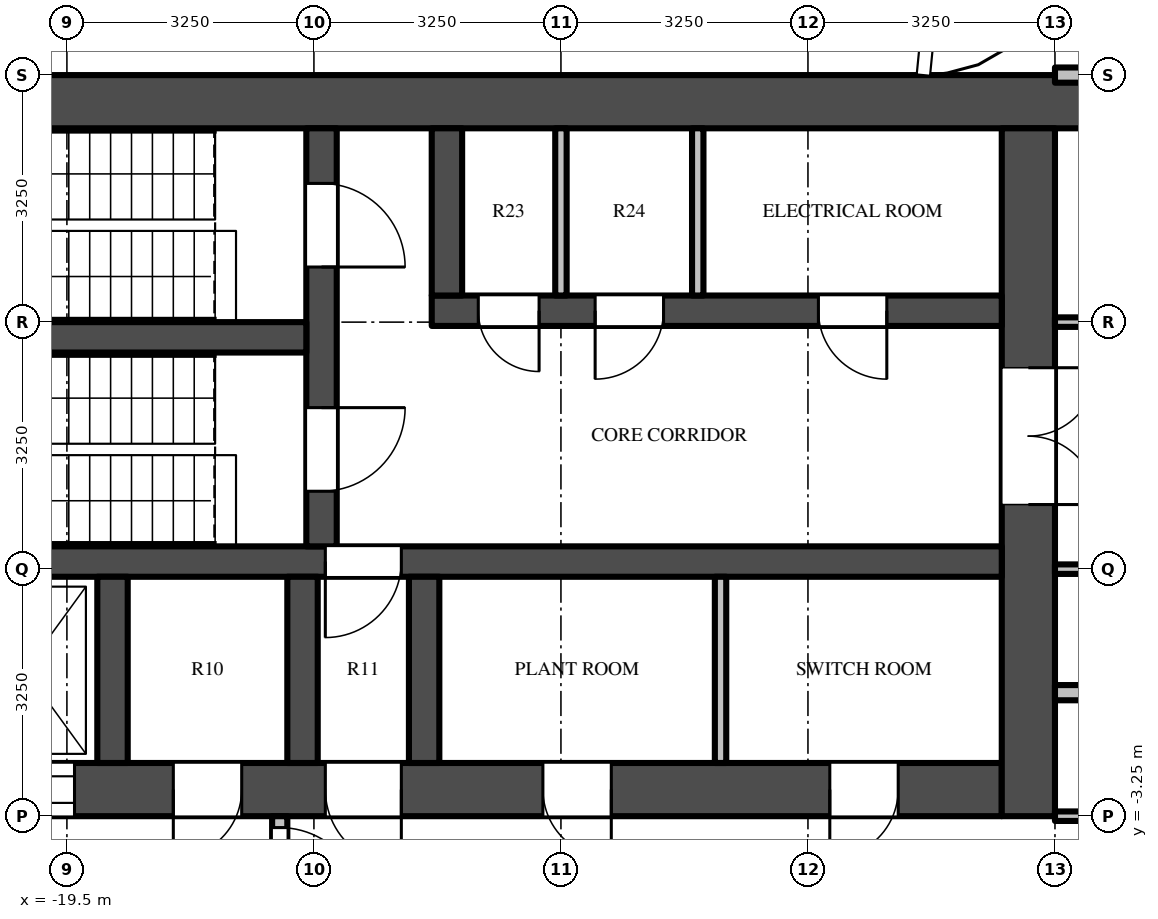
"""IFC4 building model, lengths in metres.
Left out: names, types, materials, properties, quantities, classifications, styles, units other than length and angle.
Written with IfcOpenShell. Run it as: python <this file> out.ifc"""

import sys

from ifc_helpers import new_model, si_unit, direction, frame, frame_2d, origin, place, context, subcontext, project, spatial, rectangle, extrude, source, transform, mapped, element, fill, save


model = new_model("IFC4")
c1 = context("Model", 3, precision=1e-05, world=origin(), true_north=direction((0.0, 1.0)))
c2 = subcontext(c1, "Body", "Model", "MODEL_VIEW")
j1 = project(units=[si_unit("LENGTHUNIT", "METRE"), si_unit("PLANEANGLEUNIT", "RADIAN")], contexts=[c1])
p1 = place(None, origin())
s1 = spatial("IfcSite", under=j1, at=p1, CompositionType="ELEMENT")
p2 = place(p1, origin())
s2 = spatial("IfcBuilding", under=s1, at=p2, CompositionType="ELEMENT")
p3 = place(p2, frame((0.0, 0.0, 350.1)))
s3 = spatial("IfcBuildingStorey", under=s2, at=p3, CompositionType="ELEMENT", Elevation=350.1)
m1 = source(origin(), c2, "Body", "SweptSolid", [
    extrude(rectangle(XDim=16.75, YDim=0.7, at=frame_2d((8.375, 0.0))), origin(), (0.0, 0.0, 1.0), 3.75),
])
p4 = place(p3, frame((-6.0, 6.15, 0.0), z_axis=(0.0, 0.0, 1.0), x_axis=(-1.0, 0.0, 0.0)))
e1 = element("IfcWall", 1, at=p4, inside=s3, PredefinedType="SHEAR", context=c2, shape_type="MappedRepresentation", body=[
    mapped(m1, transform((0.0, 0.0, 0.0))),
])
m2 = source(origin(), c2, "Body", "SweptSolid", [
    extrude(rectangle(XDim=14.85, YDim=0.7, at=frame_2d((7.425, 0.0))), origin(), (0.0, 0.0, 1.0), 3.75),
])
p5 = place(p3, frame((-7.2, -2.9, 0.0), z_axis=(0.0, 0.0, 1.0), x_axis=(-1.0, 0.0, 0.0)))
e2 = element("IfcWall", 2, at=p5, inside=s3, PredefinedType="SHEAR", context=c2, shape_type="MappedRepresentation", body=[
    mapped(m2, transform((0.0, 0.0, 0.0))),
])
m3 = source(origin(), c2, "Body", "SweptSolid", [
    extrude(rectangle(XDim=1.3, YDim=2.1, at=frame_2d((0.65, 1.05))), frame((0.0, 0.36, 0.0), z_axis=(0.0, -1.0, 0.0), x_axis=(1.0, 0.0, 0.0)), (0.0, 0.0, 1.0), 0.72),
])
p6 = place(p5, frame((12.2, 0.0, 0.0)))
e3 = element("IfcOpeningElement", 3, at=p6, cuts=e2, PredefinedType="OPENING", context=c2, shape_type="MappedRepresentation", body=[
    mapped(m3, transform((0.0, 0.0, 0.0))),
])
m4 = source(origin(), c2, "Body", "SweptSolid", [
    extrude(rectangle(XDim=1.0, YDim=2.1, at=frame_2d((0.5, 1.05))), frame((0.0, 0.36, 0.0), z_axis=(0.0, -1.0, 0.0), x_axis=(1.0, 0.0, 0.0)), (0.0, 0.0, 1.0), 0.72),
])
p7 = place(p5, frame((7.9, 0.0, 0.0)))
e4 = element("IfcOpeningElement", 4, at=p7, cuts=e2, PredefinedType="OPENING", context=c2, shape_type="MappedRepresentation", body=[
    mapped(m4, transform((0.0, 0.0, 0.0))),
])
m5 = source(origin(), c2, "Body", "SweptSolid", [
    extrude(rectangle(XDim=0.9, YDim=2.1, at=frame_2d((0.45, 1.05))), frame((0.0, 0.36, 0.0), z_axis=(0.0, -1.0, 0.0), x_axis=(1.0, 0.0, 0.0)), (0.0, 0.0, 1.0), 0.72),
])
p8 = place(p5, frame((1.363, 0.0, 0.0)))
e5 = element("IfcOpeningElement", 5, at=p8, cuts=e2, PredefinedType="OPENING", context=c2, shape_type="MappedRepresentation", body=[
    mapped(m5, transform((0.0, 0.0, 0.0))),
])
p9 = place(p5, frame((5.137, 0.0, 0.0)))
e6 = element("IfcOpeningElement", 6, at=p9, cuts=e2, PredefinedType="OPENING", context=c2, shape_type="MappedRepresentation", body=[
    mapped(m5, transform((0.0, 0.0, 0.0))),
])
p10 = place(p5, frame((10.0, 0.0, 0.0)))
e7 = element("IfcOpeningElement", 7, at=p10, cuts=e2, PredefinedType="OPENING", context=c2, shape_type="MappedRepresentation", body=[
    mapped(m5, transform((0.0, 0.0, 0.0))),
])
m6 = source(origin(), c2, "Body", "SweptSolid", [
    extrude(rectangle(XDim=9.05, YDim=0.7, at=frame_2d((4.525, 0.0))), origin(), (0.0, 0.0, 1.0), 3.75),
])
p11 = place(p3, frame((-6.85, 5.8, 0.0), z_axis=(0.0, 0.0, 1.0), x_axis=(0.0, -1.0, 0.0)))
e8 = element("IfcWall", 8, at=p11, inside=s3, PredefinedType="SHEAR", context=c2, shape_type="MappedRepresentation", body=[
    mapped(m6, transform((0.0, 0.0, 0.0))),
])
m7 = source(origin(), c2, "Body", "SweptSolid", [
    extrude(rectangle(XDim=1.8, YDim=2.1, at=frame_2d((0.9, 1.05))), frame((0.0, 0.36, 0.0), z_axis=(0.0, -1.0, 0.0), x_axis=(1.0, 0.0, 0.0)), (0.0, 0.0, 1.0), 0.72),
])
p12 = place(p11, frame((3.15, 0.0, 0.0)))
e9 = element("IfcOpeningElement", 9, at=p12, cuts=e8, PredefinedType="OPENING", context=c2, shape_type="MappedRepresentation", body=[
    mapped(m7, transform((0.0, 0.0, 0.0))),
])
m8 = source(origin(), c2, "Body", "SweptSolid", [
    extrude(rectangle(XDim=7.5, YDim=0.4, at=frame_2d((3.75, 0.0))), origin(), (0.0, 0.0, 1.0), 3.75),
])
p13 = place(p3, frame((-7.2, 3.4, 0.0), z_axis=(0.0, 0.0, 1.0), x_axis=(-1.0, 0.0, 0.0)))
e10 = element("IfcWall", 10, at=p13, inside=s3, PredefinedType="SHEAR", context=c2, shape_type="MappedRepresentation", body=[
    mapped(m8, transform((0.0, 0.0, 0.0))),
])
m9 = source(origin(), c2, "Body", "SweptSolid", [
    extrude(rectangle(XDim=0.9, YDim=2.1, at=frame_2d((0.45, 1.05))), frame((0.0, 0.21, 0.0), z_axis=(0.0, -1.0, 0.0), x_axis=(1.0, 0.0, 0.0)), (0.0, 0.0, 1.0), 0.42),
])
p14 = place(p13, frame((1.512, 0.0, 0.0)))
e11 = element("IfcOpeningElement", 11, at=p14, cuts=e10, PredefinedType="OPENING", context=c2, shape_type="MappedRepresentation", body=[
    mapped(m9, transform((0.0, 0.0, 0.0))),
])
p15 = place(p13, frame((4.45, 0.0, 0.0)))
e12 = element("IfcOpeningElement", 12, at=p15, cuts=e10, PredefinedType="OPENING", context=c2, shape_type="MappedRepresentation", body=[
    mapped(m9, transform((0.0, 0.0, 0.0))),
])
m10 = source(origin(), c2, "Body", "SweptSolid", [
    extrude(rectangle(XDim=0.8, YDim=2.1, at=frame_2d((0.4, 1.05))), frame((0.0, 0.21, 0.0), z_axis=(0.0, -1.0, 0.0), x_axis=(1.0, 0.0, 0.0)), (0.0, 0.0, 1.0), 0.42),
])
p16 = place(p13, frame((6.087, 0.0, 0.0)))
e13 = element("IfcOpeningElement", 13, at=p16, cuts=e10, PredefinedType="OPENING", context=c2, shape_type="MappedRepresentation", body=[
    mapped(m10, transform((0.0, 0.0, 0.0))),
])
m11 = source(origin(), c2, "Body", "SweptSolid", [
    extrude(rectangle(XDim=14.85, YDim=0.4, at=frame_2d((7.425, 0.0))), origin(), (0.0, 0.0, 1.0), 3.75),
])
p17 = place(p3, frame((-7.2, 0.1, 0.0), z_axis=(0.0, 0.0, 1.0), x_axis=(-1.0, 0.0, 0.0)))
e14 = element("IfcWall", 14, at=p17, inside=s3, PredefinedType="SHEAR", context=c2, shape_type="MappedRepresentation", body=[
    mapped(m11, transform((0.0, 0.0, 0.0))),
])
m12 = source(origin(), c2, "Body", "SweptSolid", [
    extrude(rectangle(XDim=1.0, YDim=2.1, at=frame_2d((0.5, 1.05))), frame((0.0, 0.21, 0.0), z_axis=(0.0, -1.0, 0.0), x_axis=(1.0, 0.0, 0.0)), (0.0, 0.0, 1.0), 0.42),
])
p18 = place(p17, frame((7.9, 0.0, 0.0)))
e15 = element("IfcOpeningElement", 15, at=p18, cuts=e14, PredefinedType="OPENING", context=c2, shape_type="MappedRepresentation", body=[
    mapped(m12, transform((0.0, 0.0, 0.0))),
])
m13 = source(origin(), c2, "Body", "SweptSolid", [
    extrude(rectangle(XDim=5.5, YDim=0.4, at=frame_2d((2.75, 0.0))), origin(), (0.0, 0.0, 1.0), 3.75),
])
p19 = place(p3, frame((-16.15, 5.8, 0.0), z_axis=(0.0, 0.0, 1.0), x_axis=(0.0, -1.0, 0.0)))
e16 = element("IfcWall", 16, at=p19, inside=s3, PredefinedType="SHEAR", context=c2, shape_type="MappedRepresentation", body=[
    mapped(m13, transform((0.0, 0.0, 0.0))),
])
m14 = source(origin(), c2, "Body", "SweptSolid", [
    extrude(rectangle(XDim=1.1, YDim=2.1, at=frame_2d((0.55, 1.05))), frame((0.0, 0.21, 0.0), z_axis=(0.0, -1.0, 0.0), x_axis=(1.0, 0.0, 0.0)), (0.0, 0.0, 1.0), 0.42),
])
p20 = place(p19, frame((0.725, 0.0, 0.0)))
e17 = element("IfcOpeningElement", 17, at=p20, cuts=e16, PredefinedType="OPENING", context=c2, shape_type="MappedRepresentation", body=[
    mapped(m14, transform((0.0, 0.0, 0.0))),
])
p21 = place(p19, frame((3.675, 0.0, 0.0)))
e18 = element("IfcOpeningElement", 18, at=p21, cuts=e16, PredefinedType="OPENING", context=c2, shape_type="MappedRepresentation", body=[
    mapped(m14, transform((0.0, 0.0, 0.0))),
])
m15 = source(origin(), c2, "Body", "SweptSolid", [
    extrude(rectangle(XDim=5.7, YDim=0.4, at=frame_2d((2.85, 0.0))), origin(), (0.0, 0.0, 1.0), 3.75),
])
p22 = place(p3, frame((-16.35, 3.05, 0.0), z_axis=(0.0, 0.0, 1.0), x_axis=(-1.0, 0.0, 0.0)))
e19 = element("IfcWall", 19, at=p22, inside=s3, PredefinedType="SHEAR", context=c2, shape_type="MappedRepresentation", body=[
    mapped(m15, transform((0.0, 0.0, 0.0))),
])
m16 = source(origin(), c2, "Body", "SweptSolid", [
    extrude(rectangle(XDim=2.2, YDim=0.4, at=frame_2d((1.1, 0.0))), origin(), (0.0, 0.0, 1.0), 3.75),
])
p23 = place(p3, frame((-14.5, 5.8, 0.0), z_axis=(0.0, 0.0, 1.0), x_axis=(0.0, -1.0, 0.0)))
e20 = element("IfcWall", 20, at=p23, inside=s3, PredefinedType="SHEAR", context=c2, shape_type="MappedRepresentation", body=[
    mapped(m16, transform((0.0, 0.0, 0.0))),
])
m17 = source(origin(), c2, "Body", "SweptSolid", [
    extrude(rectangle(XDim=2.45, YDim=0.4, at=frame_2d((1.225, 0.0))), origin(), (0.0, 0.0, 1.0), 3.75),
])
for number, where, z_axis, x_axis in (
    (21, (-14.8, -0.1, 0.0), (0.0, 0.0, 1.0), (0.0, -1.0, 0.0)),
    (22, (-16.4, -0.1, 0.0), (0.0, 0.0, 1.0), (0.0, -1.0, 0.0)),
    (23, (-18.9, -0.1, 0.0), (0.0, 0.0, 1.0), (0.0, -1.0, 0.0)),
):
    element("IfcWall", number, at=place(p3, frame(where, z_axis=z_axis, x_axis=x_axis)), inside=s3, PredefinedType="SHEAR", context=c2, shape_type="MappedRepresentation", body=[
        mapped(m17, transform((0.0, 0.0, 0.0))),
    ])
m18 = source(origin(), c2, "Body", "SweptSolid", [
    extrude(rectangle(XDim=3.25, YDim=0.2, at=frame_2d((1.625, 0.0))), origin(), (0.0, 0.0, 1.0), 3.75),
])
p24 = place(p3, frame((-16.7, -3.25, 0.0), z_axis=(0.0, 0.0, 1.0), x_axis=(0.0, -1.0, 0.0)))
e24 = element("IfcWall", 24, at=p24, inside=s3, PredefinedType="PARTITIONING", context=c2, shape_type="MappedRepresentation", body=[
    mapped(m18, transform((0.0, 0.0, 0.0))),
])
m19 = source(origin(), c2, "Body", "SweptSolid", [
    extrude(rectangle(XDim=1.1, YDim=2.1, at=frame_2d((0.55, 1.05))), frame((0.0, 0.11, 0.0), z_axis=(0.0, -1.0, 0.0), x_axis=(1.0, 0.0, 0.0)), (0.0, 0.0, 1.0), 0.22),
])
p25 = place(p24, frame((0.15, 0.0, 0.0)))
e25 = element("IfcOpeningElement", 25, at=p25, cuts=e24, PredefinedType="OPENING", context=c2, shape_type="MappedRepresentation", body=[
    mapped(m19, transform((0.0, 0.0, 0.0))),
])
m20 = source(origin(), c2, "Body", "SweptSolid", [
    extrude(rectangle(XDim=2.2, YDim=0.15, at=frame_2d((1.1, 0.0))), origin(), (0.0, 0.0, 1.0), 3.75),
])
for number, where, z_axis, x_axis in (
    (26, (-11.2, 5.8, 0.0), (0.0, 0.0, 1.0), (0.0, -1.0, 0.0)),
    (27, (-13.0, 5.8, 0.0), (0.0, 0.0, 1.0), (0.0, -1.0, 0.0)),
):
    element("IfcWall", number, at=place(p3, frame(where, z_axis=z_axis, x_axis=x_axis)), inside=s3, PredefinedType="PARTITIONING", context=c2, shape_type="MappedRepresentation", body=[
        mapped(m20, transform((0.0, 0.0, 0.0))),
    ])
m21 = source(origin(), c2, "Body", "SweptSolid", [
    extrude(rectangle(XDim=2.45, YDim=0.15, at=frame_2d((1.225, 0.0))), origin(), (0.0, 0.0, 1.0), 3.75),
])
p26 = place(p3, frame((-10.9, -0.1, 0.0), z_axis=(0.0, 0.0, 1.0), x_axis=(0.0, -1.0, 0.0)))
e28 = element("IfcWall", 28, at=p26, inside=s3, PredefinedType="PARTITIONING", context=c2, shape_type="MappedRepresentation", body=[
    mapped(m21, transform((0.0, 0.0, 0.0))),
])
m22 = source(origin(), c2, "Body", "SweptSolid", [
    extrude(rectangle(XDim=5.363, YDim=0.125, at=frame_2d((2.681, 0.0))), origin(), (0.0, 0.0, 1.0), 3.046),
])
p27 = place(p3, frame((-1.137, -3.25, 0.0), z_axis=(0.0, 0.0, 1.0), x_axis=(-1.0, 0.0, 0.0)))
e29 = element("IfcWall", 29, at=p27, inside=s3, PredefinedType="PARTITIONING", context=c2, shape_type="MappedRepresentation", body=[
    mapped(m22, transform((0.0, 0.0, 0.0))),
])
m23 = source(origin(), c2, "Body", "SweptSolid", [
    extrude(rectangle(XDim=1.0, YDim=2.1, at=frame_2d((0.5, 1.05))), frame((0.0, 0.073, 0.0), z_axis=(0.0, -1.0, 0.0), x_axis=(1.0, 0.0, 0.0)), (0.0, 0.0, 1.0), 0.145),
])
p28 = place(p27, frame((4.012, 0.0, 0.0)))
e30 = element("IfcOpeningElement", 30, at=p28, cuts=e29, PredefinedType="OPENING", context=c2, shape_type="MappedRepresentation", body=[
    mapped(m23, transform((0.0, 0.0, 0.0))),
])
m24 = source(origin(), c2, "Body", "SweptSolid", [
    extrude(rectangle(XDim=5.238, YDim=0.2, at=frame_2d((2.619, 0.0))), origin(), (0.0, 0.0, 1.0), 3.046),
])
p29 = place(p3, frame((-6.5, -1.625, 0.0), z_axis=(0.0, 0.0, 1.0), x_axis=(1.0, 0.0, 0.0)))
e31 = element("IfcWall", 31, at=p29, inside=s3, PredefinedType="PARTITIONING", context=c2, shape_type="MappedRepresentation", body=[
    mapped(m24, transform((0.0, 0.0, 0.0))),
])
p30 = place(p3, frame((-1.137, 0.0, 0.0), z_axis=(0.0, 0.0, 1.0), x_axis=(-1.0, 0.0, 0.0)))
e32 = element("IfcWall", 32, at=p30, inside=s3, PredefinedType="PARTITIONING", context=c2, shape_type="MappedRepresentation", body=[
    mapped(m22, transform((0.0, 0.0, 0.0))),
])
p31 = place(p30, frame((4.012, 0.0, 0.0)))
e33 = element("IfcOpeningElement", 33, at=p31, cuts=e32, PredefinedType="OPENING", context=c2, shape_type="MappedRepresentation", body=[
    mapped(m23, transform((0.0, 0.0, 0.0))),
])
p32 = place(p3, frame((-6.5, 3.25, 0.0), z_axis=(0.0, 0.0, 1.0), x_axis=(1.0, 0.0, 0.0)))
e34 = element("IfcWall", 34, at=p32, inside=s3, PredefinedType="PARTITIONING", context=c2, shape_type="MappedRepresentation", body=[
    mapped(m22, transform((0.0, 0.0, 0.0))),
])
p33 = place(p32, frame((3.95, 0.0, 0.0)))
e35 = element("IfcOpeningElement", 35, at=p33, cuts=e34, PredefinedType="OPENING", context=c2, shape_type="MappedRepresentation", body=[
    mapped(m23, transform((0.0, 0.0, 0.0))),
])
p34 = place(p3, frame((-6.5, 6.5, 0.0), z_axis=(0.0, 0.0, 1.0), x_axis=(1.0, 0.0, 0.0)))
e36 = element("IfcWall", 36, at=p34, inside=s3, PredefinedType="PARTITIONING", context=c2, shape_type="SweptSolid", body=[
    extrude(rectangle(XDim=5.363, YDim=0.2, at=frame_2d((2.681, 0.0))), origin(), (0.0, 0.0, 1.0), 2.63),
])
m25 = source(origin(), c2, "Body", "SweptSolid", [
    extrude(rectangle(XDim=1.3, YDim=2.1, at=frame_2d((0.65, 1.05))), frame((0.0, -0.275, 0.0), z_axis=(0.0, -1.0, 0.0), x_axis=(1.0, 0.0, 0.0)), (0.0, 0.0, 1.0), 0.05),
])
p35 = place(p6, origin())
e37 = element("IfcDoor", 37, at=p35, inside=s3, OperationType="DOUBLE_DOOR_SLIDING", PredefinedType="DOOR", context=c2, shape_type="MappedRepresentation", body=[
    mapped(m25, transform((0.0, 0.0, 0.0))),
])
fill(e3, e37)
m26 = source(origin(), c2, "Body", "SweptSolid", [
    extrude(rectangle(XDim=1.8, YDim=2.1, at=frame_2d((0.9, 1.05))), frame((0.0, -0.275, 0.0), z_axis=(0.0, -1.0, 0.0), x_axis=(1.0, 0.0, 0.0)), (0.0, 0.0, 1.0), 0.05),
])
p36 = place(p12, origin())
e38 = element("IfcDoor", 38, at=p36, inside=s3, OperationType="DOUBLE_DOOR_SINGLE_SWING", PredefinedType="DOOR", context=c2, shape_type="MappedRepresentation", body=[
    mapped(m26, transform((0.0, 0.0, 0.0))),
])
fill(e9, e38)
m27 = source(origin(), c2, "Body", "SweptSolid", [
    extrude(rectangle(XDim=1.1, YDim=2.1, at=frame_2d((0.55, 1.05))), frame((0.0, 0.025, 0.0), z_axis=(0.0, -1.0, 0.0), x_axis=(1.0, 0.0, 0.0)), (0.0, 0.0, 1.0), 0.05),
])
p37 = place(p20, origin())
e39 = element("IfcDoor", 39, at=p37, inside=s3, OperationType="SINGLE_SWING_RIGHT", PredefinedType="DOOR", context=c2, shape_type="MappedRepresentation", body=[
    mapped(m27, transform((0.0, 0.0, 0.0))),
])
fill(e17, e39)
p38 = place(p21, origin())
e40 = element("IfcDoor", 40, at=p38, inside=s3, OperationType="SINGLE_SWING_LEFT", PredefinedType="DOOR", context=c2, shape_type="MappedRepresentation", body=[
    mapped(m27, transform((0.0, 0.0, 0.0))),
])
fill(e18, e40)
m28 = source(origin(), c2, "Body", "SweptSolid", [
    extrude(rectangle(XDim=1.0, YDim=2.1, at=frame_2d((0.5, 1.05))), frame((0.0, 0.025, 0.0), z_axis=(0.0, -1.0, 0.0), x_axis=(1.0, 0.0, 0.0)), (0.0, 0.0, 1.0), 0.05),
])
p39 = place(p18, origin())
e41 = element("IfcDoor", 41, at=p39, inside=s3, OperationType="SINGLE_SWING_RIGHT", PredefinedType="DOOR", context=c2, shape_type="MappedRepresentation", body=[
    mapped(m28, transform((0.0, 0.0, 0.0))),
])
fill(e15, e41)
m29 = source(origin(), c2, "Body", "SweptSolid", [
    extrude(rectangle(XDim=1.0, YDim=2.1, at=frame_2d((0.5, 1.05))), frame((0.0, -0.275, 0.0), z_axis=(0.0, -1.0, 0.0), x_axis=(1.0, 0.0, 0.0)), (0.0, 0.0, 1.0), 0.05),
])
p40 = place(p7, origin())
e42 = element("IfcDoor", 42, at=p40, inside=s3, OperationType="SINGLE_SWING_LEFT", PredefinedType="DOOR", context=c2, shape_type="MappedRepresentation", body=[
    mapped(m29, transform((0.0, 0.0, 0.0))),
])
fill(e4, e42)
p41 = place(p25, origin())
e43 = element("IfcDoor", 43, at=p41, inside=s3, OperationType="SINGLE_SWING_RIGHT", PredefinedType="DOOR", context=c2, shape_type="MappedRepresentation", body=[
    mapped(m27, transform((0.0, 0.0, 0.0))),
])
fill(e25, e43)
m30 = source(origin(), c2, "Body", "SweptSolid", [
    extrude(rectangle(XDim=0.9, YDim=2.1, at=frame_2d((0.45, 1.05))), frame((0.0, 0.025, 0.0), z_axis=(0.0, -1.0, 0.0), x_axis=(1.0, 0.0, 0.0)), (0.0, 0.0, 1.0), 0.05),
])
p42 = place(p14, origin())
e44 = element("IfcDoor", 44, at=p42, inside=s3, OperationType="SINGLE_SWING_LEFT", PredefinedType="DOOR", context=c2, shape_type="MappedRepresentation", body=[
    mapped(m30, transform((0.0, 0.0, 0.0))),
])
fill(e11, e44)
p43 = place(p15, origin())
e45 = element("IfcDoor", 45, at=p43, inside=s3, OperationType="SINGLE_SWING_RIGHT", PredefinedType="DOOR", context=c2, shape_type="MappedRepresentation", body=[
    mapped(m30, transform((0.0, 0.0, 0.0))),
])
fill(e12, e45)
m31 = source(origin(), c2, "Body", "SweptSolid", [
    extrude(rectangle(XDim=0.8, YDim=2.1, at=frame_2d((0.4, 1.05))), frame((0.0, 0.025, 0.0), z_axis=(0.0, -1.0, 0.0), x_axis=(1.0, 0.0, 0.0)), (0.0, 0.0, 1.0), 0.05),
])
p44 = place(p16, origin())
e46 = element("IfcDoor", 46, at=p44, inside=s3, OperationType="SINGLE_SWING_LEFT", PredefinedType="DOOR", context=c2, shape_type="MappedRepresentation", body=[
    mapped(m31, transform((0.0, 0.0, 0.0))),
])
fill(e13, e46)
m32 = source(origin(), c2, "Body", "SweptSolid", [
    extrude(rectangle(XDim=0.9, YDim=2.1, at=frame_2d((0.45, 1.05))), frame((0.0, -0.275, 0.0), z_axis=(0.0, -1.0, 0.0), x_axis=(1.0, 0.0, 0.0)), (0.0, 0.0, 1.0), 0.05),
])
p45 = place(p8, origin())
e47 = element("IfcDoor", 47, at=p45, inside=s3, OperationType="SINGLE_SWING_RIGHT", PredefinedType="DOOR", context=c2, shape_type="MappedRepresentation", body=[
    mapped(m32, transform((0.0, 0.0, 0.0))),
])
fill(e5, e47)
p46 = place(p9, origin())
e48 = element("IfcDoor", 48, at=p46, inside=s3, OperationType="SINGLE_SWING_LEFT", PredefinedType="DOOR", context=c2, shape_type="MappedRepresentation", body=[
    mapped(m32, transform((0.0, 0.0, 0.0))),
])
fill(e6, e48)
p47 = place(p10, origin())
e49 = element("IfcDoor", 49, at=p47, inside=s3, OperationType="SINGLE_SWING_RIGHT", PredefinedType="DOOR", context=c2, shape_type="MappedRepresentation", body=[
    mapped(m32, transform((0.0, 0.0, 0.0))),
])
fill(e7, e49)
save(model, sys.argv[1])
